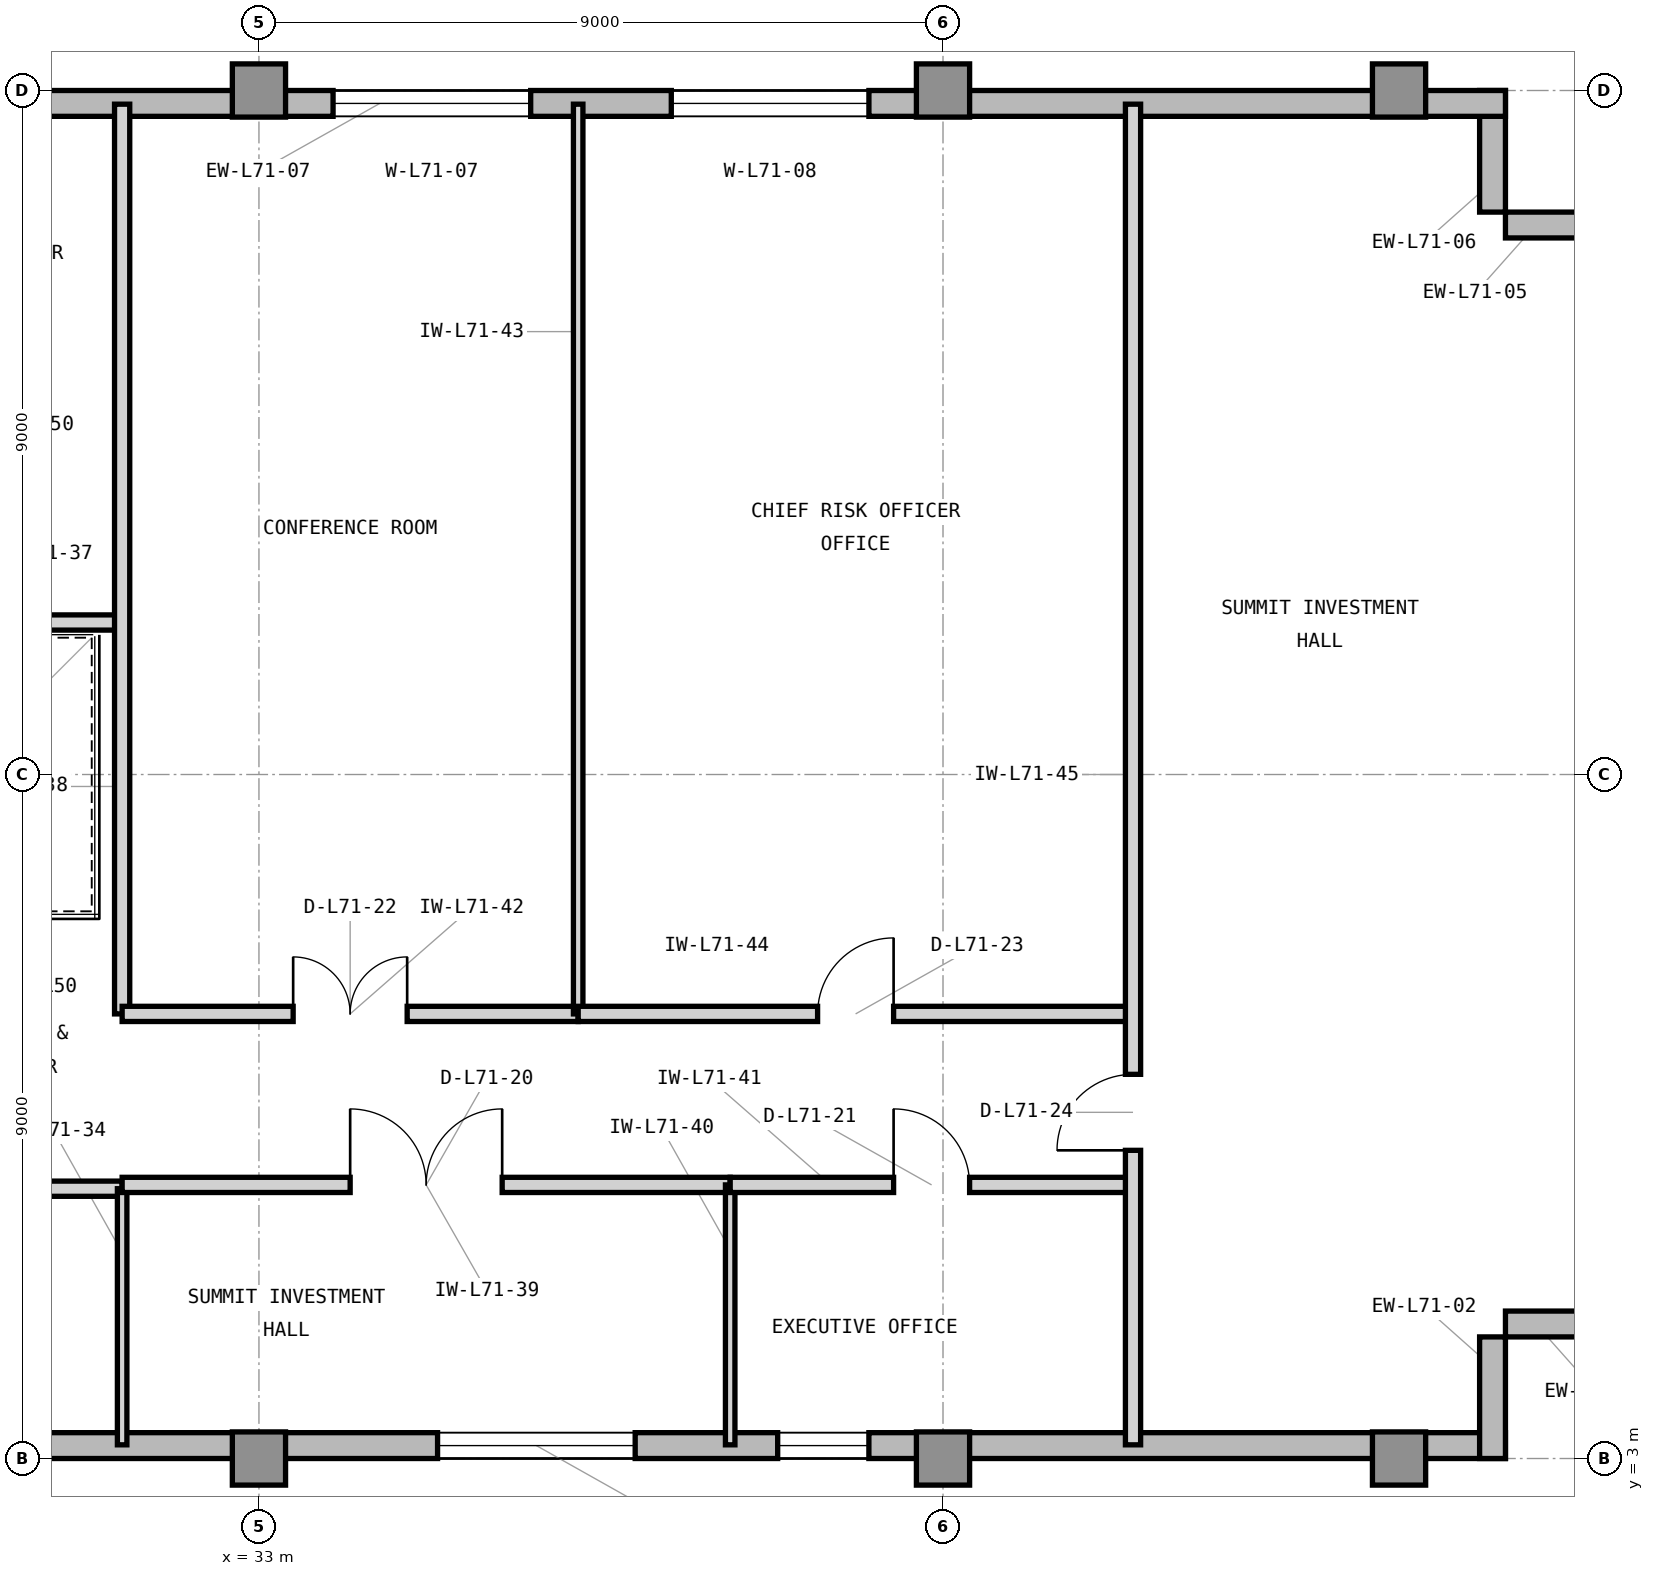
"""IFC4 building model, lengths in metres.
Left out: names, types, materials, properties, quantities, classifications, styles, units other than length and angle.
Written with IfcOpenShell. Run it as: python <this file> out.ifc"""

import sys

from ifc_helpers import new_model, si_unit, direction, frame, frame_2d, origin, origin_2d, place, context, subcontext, project, spatial, rectangle, extrude, element, fill, save


model = new_model("IFC4")
c1 = context("Model", 3, precision=1e-05, world=origin(), true_north=direction((0.0, 1.0)))
c2 = subcontext(c1, "Body", "Model", "MODEL_VIEW")
j1 = project(units=[si_unit("LENGTHUNIT", "METRE"), si_unit("PLANEANGLEUNIT", "RADIAN")], contexts=[c1])
p1 = place(None, origin())
s1 = spatial("IfcSite", under=j1, at=p1, CompositionType="ELEMENT")
p2 = place(p1, origin())
s2 = spatial("IfcBuilding", under=s1, at=p2, CompositionType="ELEMENT")
p3 = place(p2, frame((0.0, 0.0, 289.8)))
s3 = spatial("IfcBuildingStorey", under=s2, at=p3, CompositionType="ELEMENT", Elevation=289.8)
for number, where, z_axis, x_axis in (
    (1, (33.0, 3.0, 0.0), (0.0, 0.0, 1.0), (1.0, 0.0, 0.0)),
    (2, (33.0, 21.0, 0.0), (0.0, 0.0, 1.0), (1.0, 0.0, 0.0)),
    (3, (42.0, 3.0, 0.0), (0.0, 0.0, 1.0), (1.0, 0.0, 0.0)),
    (4, (42.0, 21.0, 0.0), (0.0, 0.0, 1.0), (1.0, 0.0, 0.0)),
    (5, (48.0, 3.0, 0.0), (0.0, 0.0, 1.0), (1.0, 0.0, 0.0)),
    (6, (48.0, 21.0, 0.0), (0.0, 0.0, 1.0), (1.0, 0.0, 0.0)),
):
    element("IfcColumn", number, at=place(p3, frame(where, z_axis=z_axis, x_axis=x_axis)), inside=s3, PredefinedType="COLUMN", context=c2, shape_type="SweptSolid", body=[
        extrude(rectangle(XDim=0.7, YDim=0.7, at=origin_2d()), origin(), (0.0, 0.0, 1.0), 3.9),
    ])
p4 = place(p3, frame((23.9, 3.17, 0.0), z_axis=(0.0, 0.0, 1.0), x_axis=(1.0, 0.0, 0.0)))
e7 = element("IfcWall", 7, at=p4, inside=s3, PredefinedType="STANDARD", context=c2, shape_type="SweptSolid", body=[
    extrude(rectangle(XDim=25.5, YDim=0.34, at=frame_2d((12.75, 0.0))), origin(), (0.0, 0.0, 1.0), 3.715),
])
p5 = place(p4, frame((1.6, 0.0, 0.8)))
e8 = element("IfcOpeningElement", 8, at=p5, cuts=e7, PredefinedType="OPENING", context=c2, shape_type="SweptSolid", body=[
    extrude(rectangle(XDim=1.9, YDim=2.35, at=frame_2d((0.95, 1.175))), frame((0.0, 0.18, 0.0), z_axis=(0.0, -1.0, 0.0), x_axis=(1.0, 0.0, 0.0)), (0.0, 0.0, 1.0), 0.36),
])
p6 = place(p4, frame((11.45, 0.0, 0.8)))
e9 = element("IfcOpeningElement", 9, at=p6, cuts=e7, PredefinedType="OPENING", context=c2, shape_type="SweptSolid", body=[
    extrude(rectangle(XDim=2.6, YDim=2.35, at=frame_2d((1.3, 1.175))), frame((0.0, 0.18, 0.0), z_axis=(0.0, -1.0, 0.0), x_axis=(1.0, 0.0, 0.0)), (0.0, 0.0, 1.0), 0.36),
])
p7 = place(p4, frame((15.925, 0.0, 0.8)))
e10 = element("IfcOpeningElement", 10, at=p7, cuts=e7, PredefinedType="OPENING", context=c2, shape_type="SweptSolid", body=[
    extrude(rectangle(XDim=1.2, YDim=2.35, at=frame_2d((0.6, 1.175))), frame((0.0, 0.18, 0.0), z_axis=(0.0, -1.0, 0.0), x_axis=(1.0, 0.0, 0.0)), (0.0, 0.0, 1.0), 0.36),
])
for number, where, z_axis, x_axis in (
    (11, (49.23, 3.0, 0.0), (0.0, 0.0, 1.0), (0.0, 1.0, 0.0)),
    (12, (49.4, 4.77, 0.0), (0.0, 0.0, 1.0), (1.0, 0.0, 0.0)),
    (13, (51.0, 19.23, 0.0), (0.0, 0.0, 1.0), (-1.0, 0.0, 0.0)),
    (14, (49.23, 19.4, 0.0), (0.0, 0.0, 1.0), (0.0, 1.0, 0.0)),
):
    element("IfcWall", number, at=place(p3, frame(where, z_axis=z_axis, x_axis=x_axis)), inside=s3, PredefinedType="STANDARD", context=c2, shape_type="SweptSolid", body=[
        extrude(rectangle(XDim=1.6, YDim=0.34, at=frame_2d((0.8, 0.0))), origin(), (0.0, 0.0, 1.0), 3.715),
    ])
p8 = place(p3, frame((49.4, 20.83, 0.0), z_axis=(0.0, 0.0, 1.0), x_axis=(-1.0, 0.0, 0.0)))
e15 = element("IfcWall", 15, at=p8, inside=s3, PredefinedType="STANDARD", context=c2, shape_type="SweptSolid", body=[
    extrude(rectangle(XDim=29.62, YDim=0.34, at=frame_2d((14.81, 0.0))), origin(), (0.0, 0.0, 1.0), 3.715),
])
p9 = place(p8, frame((22.826, 0.0, 0.8)))
e16 = element("IfcOpeningElement", 16, at=p9, cuts=e15, PredefinedType="OPENING", context=c2, shape_type="SweptSolid", body=[
    extrude(rectangle(XDim=1.9, YDim=2.35, at=frame_2d((0.95, 1.175))), frame((0.0, 0.18, 0.0), z_axis=(0.0, -1.0, 0.0), x_axis=(1.0, 0.0, 0.0)), (0.0, 0.0, 1.0), 0.36),
])
p10 = place(p8, frame((12.825, 0.0, 0.8)))
e17 = element("IfcOpeningElement", 17, at=p10, cuts=e15, PredefinedType="OPENING", context=c2, shape_type="SweptSolid", body=[
    extrude(rectangle(XDim=2.6, YDim=2.35, at=frame_2d((1.3, 1.175))), frame((0.0, 0.18, 0.0), z_axis=(0.0, -1.0, 0.0), x_axis=(1.0, 0.0, 0.0)), (0.0, 0.0, 1.0), 0.36),
])
p11 = place(p8, frame((8.375, 0.0, 0.8)))
e18 = element("IfcOpeningElement", 18, at=p11, cuts=e15, PredefinedType="OPENING", context=c2, shape_type="SweptSolid", body=[
    extrude(rectangle(XDim=2.6, YDim=2.35, at=frame_2d((1.3, 1.175))), frame((0.0, 0.18, 0.0), z_axis=(0.0, -1.0, 0.0), x_axis=(1.0, 0.0, 0.0)), (0.0, 0.0, 1.0), 0.36),
])
p12 = place(p3, frame((23.85, 6.55, 0.0), z_axis=(0.0, 0.0, 1.0), x_axis=(1.0, 0.0, 0.0)))
e19 = element("IfcWall", 19, at=p12, inside=s3, PredefinedType="PARTITIONING", context=c2, shape_type="SweptSolid", body=[
    extrude(rectangle(XDim=7.35, YDim=0.2, at=frame_2d((3.675, 0.0))), origin(), (0.0, 0.0, 1.0), 3.705),
])
p13 = place(p12, frame((2.8, 0.0, 0.0)))
e20 = element("IfcOpeningElement", 20, at=p13, cuts=e19, PredefinedType="OPENING", context=c2, shape_type="SweptSolid", body=[
    extrude(rectangle(XDim=1.0, YDim=2.15, at=frame_2d((0.5, 1.075))), frame((0.0, 0.11, 0.0), z_axis=(0.0, -1.0, 0.0), x_axis=(1.0, 0.0, 0.0)), (0.0, 0.0, 1.0), 0.22),
])
p14 = place(p3, frame((31.2, 3.18, 0.0), z_axis=(0.0, 0.0, 1.0), x_axis=(0.0, 1.0, 0.0)))
e21 = element("IfcWall", 21, at=p14, inside=s3, PredefinedType="PARTITIONING", context=c2, shape_type="SweptSolid", body=[
    extrude(rectangle(XDim=3.37, YDim=0.125, at=frame_2d((1.685, 0.0))), origin(), (0.0, 0.0, 1.0), 3.705),
])
p15 = place(p3, frame((26.9, 14.0, 0.0), z_axis=(0.0, 0.0, 1.0), x_axis=(1.0, 0.0, 0.0)))
e22 = element("IfcWall", 22, at=p15, inside=s3, PredefinedType="PARTITIONING", context=c2, shape_type="SweptSolid", body=[
    extrude(rectangle(XDim=4.3, YDim=0.2, at=frame_2d((2.15, 0.0))), origin(), (0.0, 0.0, 1.0), 3.705),
])
p16 = place(p3, frame((31.2, 8.85, 0.0), z_axis=(0.0, 0.0, 1.0), x_axis=(0.0, 1.0, 0.0)))
e23 = element("IfcWall", 23, at=p16, inside=s3, PredefinedType="PARTITIONING", context=c2, shape_type="SweptSolid", body=[
    extrude(rectangle(XDim=11.97, YDim=0.2, at=frame_2d((5.985, 0.0))), origin(), (0.0, 0.0, 1.0), 3.705),
])
p17 = place(p3, frame((31.2, 6.6, 0.0), z_axis=(0.0, 0.0, 1.0), x_axis=(1.0, 0.0, 0.0)))
e24 = element("IfcWall", 24, at=p17, inside=s3, PredefinedType="PARTITIONING", context=c2, shape_type="SweptSolid", body=[
    extrude(rectangle(XDim=8.0, YDim=0.2, at=frame_2d((4.0, 0.0))), origin(), (0.0, 0.0, 1.0), 3.705),
])
p18 = place(p17, frame((3.0, 0.0, 0.0)))
e25 = element("IfcOpeningElement", 25, at=p18, cuts=e24, PredefinedType="OPENING", context=c2, shape_type="SweptSolid", body=[
    extrude(rectangle(XDim=2.0, YDim=2.5, at=frame_2d((1.0, 1.25))), frame((0.0, 0.11, 0.0), z_axis=(0.0, -1.0, 0.0), x_axis=(1.0, 0.0, 0.0)), (0.0, 0.0, 1.0), 0.22),
])
p19 = place(p3, frame((39.2, 3.18, 0.0), z_axis=(0.0, 0.0, 1.0), x_axis=(0.0, 1.0, 0.0)))
e26 = element("IfcWall", 26, at=p19, inside=s3, PredefinedType="PARTITIONING", context=c2, shape_type="SweptSolid", body=[
    extrude(rectangle(XDim=3.42, YDim=0.125, at=frame_2d((1.71, 0.0))), origin(), (0.0, 0.0, 1.0), 3.705),
])
p20 = place(p3, frame((39.2, 6.6, 0.0), z_axis=(0.0, 0.0, 1.0), x_axis=(1.0, 0.0, 0.0)))
e27 = element("IfcWall", 27, at=p20, inside=s3, PredefinedType="PARTITIONING", context=c2, shape_type="SweptSolid", body=[
    extrude(rectangle(XDim=5.3, YDim=0.2, at=frame_2d((2.65, 0.0))), origin(), (0.0, 0.0, 1.0), 3.705),
])
p21 = place(p20, frame((2.15, 0.0, 0.0)))
e28 = element("IfcOpeningElement", 28, at=p21, cuts=e27, PredefinedType="OPENING", context=c2, shape_type="SweptSolid", body=[
    extrude(rectangle(XDim=1.0, YDim=2.15, at=frame_2d((0.5, 1.075))), frame((0.0, 0.11, 0.0), z_axis=(0.0, -1.0, 0.0), x_axis=(1.0, 0.0, 0.0)), (0.0, 0.0, 1.0), 0.22),
])
p22 = place(p3, frame((31.2, 8.85, 0.0), z_axis=(0.0, 0.0, 1.0), x_axis=(1.0, 0.0, 0.0)))
e29 = element("IfcWall", 29, at=p22, inside=s3, PredefinedType="PARTITIONING", context=c2, shape_type="SweptSolid", body=[
    extrude(rectangle(XDim=6.0, YDim=0.2, at=frame_2d((3.0, 0.0))), origin(), (0.0, 0.0, 1.0), 3.705),
])
p23 = place(p22, frame((2.25, 0.0, 0.0)))
e30 = element("IfcOpeningElement", 30, at=p23, cuts=e29, PredefinedType="OPENING", context=c2, shape_type="SweptSolid", body=[
    extrude(rectangle(XDim=1.5, YDim=2.3, at=frame_2d((0.75, 1.15))), frame((0.0, 0.11, 0.0), z_axis=(0.0, -1.0, 0.0), x_axis=(1.0, 0.0, 0.0)), (0.0, 0.0, 1.0), 0.22),
])
p24 = place(p3, frame((37.2, 8.85, 0.0), z_axis=(0.0, 0.0, 1.0), x_axis=(0.0, 1.0, 0.0)))
e31 = element("IfcWall", 31, at=p24, inside=s3, PredefinedType="PARTITIONING", context=c2, shape_type="SweptSolid", body=[
    extrude(rectangle(XDim=11.97, YDim=0.125, at=frame_2d((5.985, 0.0))), origin(), (0.0, 0.0, 1.0), 3.705),
])
p25 = place(p3, frame((37.2, 8.85, 0.0), z_axis=(0.0, 0.0, 1.0), x_axis=(1.0, 0.0, 0.0)))
e32 = element("IfcWall", 32, at=p25, inside=s3, PredefinedType="PARTITIONING", context=c2, shape_type="SweptSolid", body=[
    extrude(rectangle(XDim=7.3, YDim=0.2, at=frame_2d((3.65, 0.0))), origin(), (0.0, 0.0, 1.0), 3.705),
])
p26 = place(p25, frame((3.15, 0.0, 0.0)))
e33 = element("IfcOpeningElement", 33, at=p26, cuts=e32, PredefinedType="OPENING", context=c2, shape_type="SweptSolid", body=[
    extrude(rectangle(XDim=1.0, YDim=2.15, at=frame_2d((0.5, 1.075))), frame((0.0, 0.11, 0.0), z_axis=(0.0, -1.0, 0.0), x_axis=(1.0, 0.0, 0.0)), (0.0, 0.0, 1.0), 0.22),
])
p27 = place(p3, frame((44.5, 3.18, 0.0), z_axis=(0.0, 0.0, 1.0), x_axis=(0.0, 1.0, 0.0)))
e34 = element("IfcWall", 34, at=p27, inside=s3, PredefinedType="PARTITIONING", context=c2, shape_type="SweptSolid", body=[
    extrude(rectangle(XDim=17.64, YDim=0.2, at=frame_2d((8.82, 0.0))), origin(), (0.0, 0.0, 1.0), 3.705),
])
p28 = place(p27, frame((3.875, 0.0, 0.0)))
e35 = element("IfcOpeningElement", 35, at=p28, cuts=e34, PredefinedType="OPENING", context=c2, shape_type="SweptSolid", body=[
    extrude(rectangle(XDim=1.0, YDim=2.15, at=frame_2d((0.5, 1.075))), frame((0.0, 0.11, 0.0), z_axis=(0.0, -1.0, 0.0), x_axis=(1.0, 0.0, 0.0)), (0.0, 0.0, 1.0), 0.22),
])
p29 = place(p6, origin())
e36 = element("IfcWindow", 36, at=p29, inside=s3, PartitioningType="SINGLE_PANEL", PredefinedType="WINDOW", context=c2, shape_type="SweptSolid", body=[
    extrude(rectangle(XDim=2.6, YDim=2.35, at=frame_2d((1.3, 1.175))), frame((0.0, 0.11, 0.0), z_axis=(0.0, -1.0, 0.0), x_axis=(1.0, 0.0, 0.0)), (0.0, 0.0, 1.0), 0.06),
])
fill(e9, e36)
p30 = place(p18, origin())
e37 = element("IfcDoor", 37, at=p30, inside=s3, OperationType="DOUBLE_DOOR_SINGLE_SWING", PredefinedType="DOOR", context=c2, shape_type="SweptSolid", body=[
    extrude(rectangle(XDim=2.0, YDim=2.5, at=frame_2d((1.0, 1.25))), frame((0.0, 0.025, 0.0), z_axis=(0.0, -1.0, 0.0), x_axis=(1.0, 0.0, 0.0)), (0.0, 0.0, 1.0), 0.05),
])
fill(e25, e37)
p31 = place(p21, origin())
e38 = element("IfcDoor", 38, at=p31, inside=s3, OperationType="SINGLE_SWING_LEFT", PredefinedType="DOOR", context=c2, shape_type="SweptSolid", body=[
    extrude(rectangle(XDim=1.0, YDim=2.15, at=frame_2d((0.5, 1.075))), frame((0.0, 0.025, 0.0), z_axis=(0.0, -1.0, 0.0), x_axis=(1.0, 0.0, 0.0)), (0.0, 0.0, 1.0), 0.05),
])
fill(e28, e38)
p32 = place(p23, origin())
e39 = element("IfcDoor", 39, at=p32, inside=s3, OperationType="DOUBLE_DOOR_SINGLE_SWING", PredefinedType="DOOR", context=c2, shape_type="SweptSolid", body=[
    extrude(rectangle(XDim=1.5, YDim=2.3, at=frame_2d((0.75, 1.15))), frame((0.0, 0.025, 0.0), z_axis=(0.0, -1.0, 0.0), x_axis=(1.0, 0.0, 0.0)), (0.0, 0.0, 1.0), 0.05),
])
fill(e30, e39)
p33 = place(p26, origin())
e40 = element("IfcDoor", 40, at=p33, inside=s3, OperationType="SINGLE_SWING_RIGHT", PredefinedType="DOOR", context=c2, shape_type="SweptSolid", body=[
    extrude(rectangle(XDim=1.0, YDim=2.15, at=frame_2d((0.5, 1.075))), frame((0.0, 0.025, 0.0), z_axis=(0.0, -1.0, 0.0), x_axis=(1.0, 0.0, 0.0)), (0.0, 0.0, 1.0), 0.05),
])
fill(e33, e40)
p34 = place(p28, origin())
e41 = element("IfcDoor", 41, at=p34, inside=s3, OperationType="SINGLE_SWING_LEFT", PredefinedType="DOOR", context=c2, shape_type="SweptSolid", body=[
    extrude(rectangle(XDim=1.0, YDim=2.15, at=frame_2d((0.5, 1.075))), frame((0.0, 0.025, 0.0), z_axis=(0.0, -1.0, 0.0), x_axis=(1.0, 0.0, 0.0)), (0.0, 0.0, 1.0), 0.05),
])
fill(e35, e41)
p35 = place(p7, origin())
e42 = element("IfcWindow", 42, at=p35, inside=s3, PartitioningType="SINGLE_PANEL", PredefinedType="WINDOW", context=c2, shape_type="SweptSolid", body=[
    extrude(rectangle(XDim=1.2, YDim=2.35, at=frame_2d((0.6, 1.175))), frame((0.0, 0.11, 0.0), z_axis=(0.0, -1.0, 0.0), x_axis=(1.0, 0.0, 0.0)), (0.0, 0.0, 1.0), 0.06),
])
fill(e10, e42)
p36 = place(p10, origin())
e43 = element("IfcWindow", 43, at=p36, inside=s3, PartitioningType="SINGLE_PANEL", PredefinedType="WINDOW", context=c2, shape_type="SweptSolid", body=[
    extrude(rectangle(XDim=2.6, YDim=2.35, at=frame_2d((1.3, 1.175))), frame((0.0, 0.11, 0.0), z_axis=(0.0, -1.0, 0.0), x_axis=(1.0, 0.0, 0.0)), (0.0, 0.0, 1.0), 0.06),
])
fill(e17, e43)
p37 = place(p11, origin())
e44 = element("IfcWindow", 44, at=p37, inside=s3, PartitioningType="SINGLE_PANEL", PredefinedType="WINDOW", context=c2, shape_type="SweptSolid", body=[
    extrude(rectangle(XDim=2.6, YDim=2.35, at=frame_2d((1.3, 1.175))), frame((0.0, 0.11, 0.0), z_axis=(0.0, -1.0, 0.0), x_axis=(1.0, 0.0, 0.0)), (0.0, 0.0, 1.0), 0.06),
])
fill(e18, e44)
save(model, sys.argv[1])
